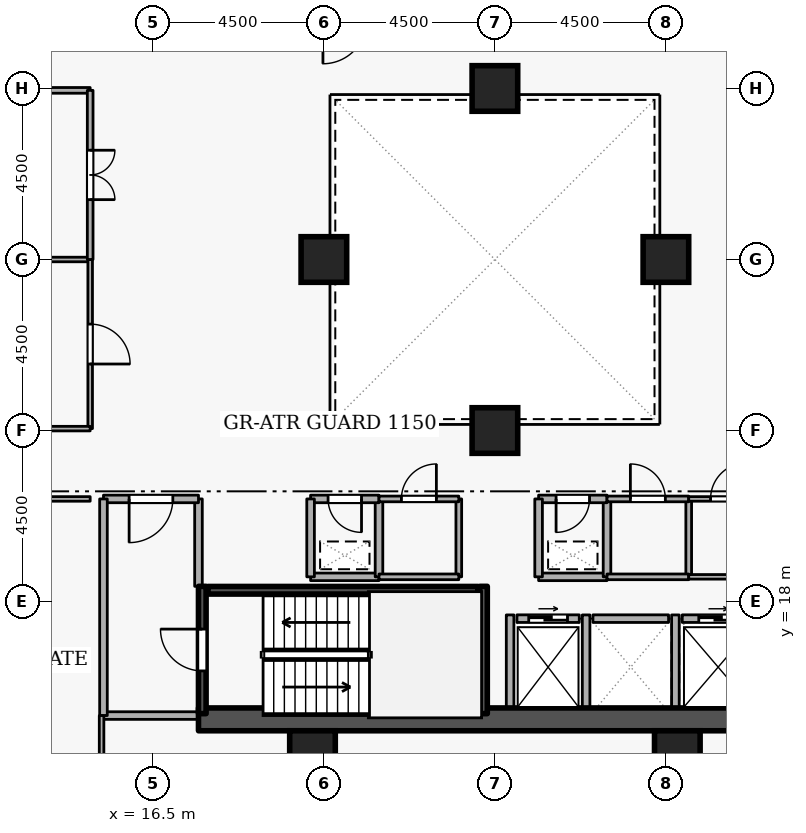
"""IFC4 building model, lengths in metres.
Left out: names, types, materials, properties, quantities, classifications, styles, units other than length and angle.
Written with IfcOpenShell. Run it as: python <this file> out.ifc"""

import sys

from ifc_helpers import new_model, si_unit, direction, frame, frame_2d, origin, origin_2d, place, context, subcontext, project, spatial, rectangle, extrude, element, fill, save


model = new_model("IFC4")
c1 = context("Model", 3, precision=1e-05, world=origin(), true_north=direction((0.0, 1.0)))
c2 = subcontext(c1, "Body", "Model", "MODEL_VIEW")
j1 = project(units=[si_unit("LENGTHUNIT", "METRE"), si_unit("PLANEANGLEUNIT", "RADIAN")], contexts=[c1])
p1 = place(None, origin())
s1 = spatial("IfcSite", under=j1, at=p1, CompositionType="ELEMENT")
p2 = place(p1, origin())
s2 = spatial("IfcBuilding", under=s1, at=p2, CompositionType="ELEMENT")
p3 = place(p2, frame((0.0, 0.0, 83.7)))
s3 = spatial("IfcBuildingStorey", under=s2, at=p3, CompositionType="ELEMENT", Elevation=83.7)
p4 = place(p3, frame((17.7, 14.9, 0.0), z_axis=(0.0, 0.0, 1.0), x_axis=(1.0, 0.0, 0.0)))
e1 = element("IfcWall", 1, at=p4, inside=s3, PredefinedType="SHEAR", context=c2, shape_type="SweptSolid", body=[
    extrude(rectangle(XDim=15.6, YDim=0.6, at=frame_2d((7.8, 0.0))), origin(), (0.0, 0.0, 1.0), 3.6),
])
for number, where, z_axis, x_axis in (
    (2, (20.7, 14.0, 0.0), (0.0, 0.0, 1.0), (1.0, 0.0, 0.0)),
    (3, (30.3, 14.0, 0.0), (0.0, 0.0, 1.0), (1.0, 0.0, 0.0)),
    (4, (25.5, 22.5, 0.0), (0.0, 0.0, 1.0), (1.0, 0.0, 0.0)),
    (5, (25.5, 31.5, 0.0), (0.0, 0.0, 1.0), (1.0, 0.0, 0.0)),
    (6, (21.0, 27.0, 0.0), (0.0, 0.0, 1.0), (1.0, 0.0, 0.0)),
    (7, (30.0, 27.0, 0.0), (0.0, 0.0, 1.0), (1.0, 0.0, 0.0)),
):
    element("IfcColumn", number, at=place(p3, frame(where, z_axis=z_axis, x_axis=x_axis)), inside=s3, PredefinedType="COLUMN", context=c2, shape_type="SweptSolid", body=[
        extrude(rectangle(XDim=1.2, YDim=1.2, at=origin_2d()), origin(), (0.0, 0.0, 1.0), 3.6),
    ])
p5 = place(p3, frame((26.08, 17.55, 0.0), z_axis=(0.0, 0.0, 1.0), x_axis=(1.0, 0.0, 0.0)))
e8 = element("IfcWall", 8, at=p5, inside=s3, PredefinedType="STANDARD", context=c2, shape_type="SweptSolid", body=[
    extrude(rectangle(XDim=1.64, YDim=0.2, at=frame_2d((0.82, 0.0))), origin(), (0.0, 0.0, 1.0), 3.34),
])
p6 = place(p5, frame((0.31, 0.0, 0.0)))
e9 = element("IfcOpeningElement", 9, at=p6, cuts=e8, PredefinedType="OPENING", context=c2, shape_type="SweptSolid", body=[
    extrude(rectangle(XDim=1.02, YDim=2.06, at=frame_2d((0.51, 1.03))), frame((0.0, 0.11, 0.0), z_axis=(0.0, -1.0, 0.0), x_axis=(1.0, 0.0, 0.0)), (0.0, 0.0, 1.0), 0.22),
])
p7 = place(p3, frame((28.08, 17.55, 0.0), z_axis=(0.0, 0.0, 1.0), x_axis=(1.0, 0.0, 0.0)))
e10 = element("IfcWall", 10, at=p7, inside=s3, PredefinedType="STANDARD", context=c2, shape_type="SweptSolid", body=[
    extrude(rectangle(XDim=1.99, YDim=0.2, at=frame_2d((0.995, 0.0))), origin(), (0.0, 0.0, 1.0), 3.34),
])
p8 = place(p3, frame((30.43, 17.55, 0.0), z_axis=(0.0, 0.0, 1.0), x_axis=(1.0, 0.0, 0.0)))
e11 = element("IfcWall", 11, at=p8, inside=s3, PredefinedType="STANDARD", context=c2, shape_type="SweptSolid", body=[
    extrude(rectangle(XDim=1.89, YDim=0.2, at=frame_2d((0.945, 0.0))), origin(), (0.0, 0.0, 1.0), 3.34),
])
p9 = place(p8, frame((0.435, 0.0, 0.0)))
e12 = element("IfcOpeningElement", 12, at=p9, cuts=e11, PredefinedType="OPENING", context=c2, shape_type="SweptSolid", body=[
    extrude(rectangle(XDim=1.02, YDim=2.06, at=frame_2d((0.51, 1.03))), frame((0.0, 0.11, 0.0), z_axis=(0.0, -1.0, 0.0), x_axis=(1.0, 0.0, 0.0)), (0.0, 0.0, 1.0), 0.22),
])
for number, where, z_axis, x_axis in (
    (13, (27.9, 15.212, 0.0), (0.0, 0.0, 1.0), (0.0, 1.0, 0.0)),
    (14, (25.9, 15.212, 0.0), (0.0, 0.0, 1.0), (0.0, 1.0, 0.0)),
    (15, (30.25, 15.212, 0.0), (0.0, 0.0, 1.0), (0.0, 1.0, 0.0)),
):
    element("IfcWall", number, at=place(p3, frame(where, z_axis=z_axis, x_axis=x_axis)), inside=s3, PredefinedType="STANDARD", context=c2, shape_type="SweptSolid", body=[
        extrude(rectangle(XDim=2.436, YDim=0.2, at=frame_2d((1.218, 0.0))), origin(), (0.0, 0.0, 1.0), 3.34),
    ])
p10 = place(p3, frame((17.8, 15.05, 0.0), z_axis=(0.0, 0.0, 1.0), x_axis=(0.0, 1.0, 0.0)))
e16 = element("IfcWall", 16, at=p10, inside=s3, PredefinedType="SHEAR", context=c2, shape_type="SweptSolid", body=[
    extrude(rectangle(XDim=3.35, YDim=0.2, at=frame_2d((1.675, 0.0))), origin(), (0.0, 0.0, 1.0), 3.6),
])
p11 = place(p10, frame((1.125, 0.0, 0.0)))
e17 = element("IfcOpeningElement", 17, at=p11, cuts=e16, PredefinedType="OPENING", context=c2, shape_type="SweptSolid", body=[
    extrude(rectangle(XDim=1.1, YDim=2.1, at=frame_2d((0.55, 1.05))), frame((0.0, 0.11, 0.0), z_axis=(0.0, -1.0, 0.0), x_axis=(1.0, 0.0, 0.0)), (0.0, 0.0, 1.0), 0.22),
])
p12 = place(p3, frame((25.2, 18.4, 0.0), z_axis=(0.0, 0.0, 1.0), x_axis=(0.0, -1.0, 0.0)))
e18 = element("IfcWall", 18, at=p12, inside=s3, PredefinedType="SHEAR", context=c2, shape_type="SweptSolid", body=[
    extrude(rectangle(XDim=3.35, YDim=0.2, at=frame_2d((1.675, 0.0))), origin(), (0.0, 0.0, 1.0), 3.6),
])
p13 = place(p3, frame((25.05, 18.297, 0.0), z_axis=(0.0, 0.0, 1.0), x_axis=(-1.0, 0.0, 0.0)))
e19 = element("IfcWall", 19, at=p13, inside=s3, PredefinedType="SHEAR", context=c2, shape_type="SweptSolid", body=[
    extrude(rectangle(XDim=7.1, YDim=0.2, at=frame_2d((3.55, 0.0))), origin(), (0.0, 0.0, 1.0), 3.6),
])
p14 = place(p3, frame((15.2, 15.0, 0.0), z_axis=(0.0, 0.0, 1.0), x_axis=(1.0, 0.0, 0.0)))
e20 = element("IfcWall", 20, at=p14, inside=s3, PredefinedType="STANDARD", context=c2, shape_type="SweptSolid", body=[
    extrude(rectangle(XDim=2.5, YDim=0.2, at=frame_2d((1.25, 0.0))), origin(), (0.0, 0.0, 1.0), 3.34),
])
p15 = place(p3, frame((17.7, 18.4, 0.0), z_axis=(0.0, 0.0, 1.0), x_axis=(0.0, 1.0, 0.0)))
e21 = element("IfcWall", 21, at=p15, inside=s3, PredefinedType="STANDARD", context=c2, shape_type="SweptSolid", body=[
    extrude(rectangle(XDim=2.3, YDim=0.2, at=frame_2d((1.15, 0.0))), origin(), (0.0, 0.0, 1.0), 2.545),
])
p16 = place(p3, frame((17.7, 20.7, 0.0), z_axis=(0.0, 0.0, 1.0), x_axis=(-1.0, 0.0, 0.0)))
e22 = element("IfcWall", 22, at=p16, inside=s3, PredefinedType="STANDARD", context=c2, shape_type="SweptSolid", body=[
    extrude(rectangle(XDim=2.5, YDim=0.2, at=frame_2d((1.25, 0.0))), origin(), (0.0, 0.0, 1.0), 3.34),
])
p17 = place(p16, frame((0.675, 0.0, 0.0)))
e23 = element("IfcOpeningElement", 23, at=p17, cuts=e22, PredefinedType="OPENING", context=c2, shape_type="SweptSolid", body=[
    extrude(rectangle(XDim=1.15, YDim=2.1, at=frame_2d((0.575, 1.05))), frame((0.0, 0.11, 0.0), z_axis=(0.0, -1.0, 0.0), x_axis=(1.0, 0.0, 0.0)), (0.0, 0.0, 1.0), 0.22),
])
p18 = place(p3, frame((15.2, 20.7, 0.0), z_axis=(0.0, 0.0, 1.0), x_axis=(0.0, -1.0, 0.0)))
e24 = element("IfcWall", 24, at=p18, inside=s3, PredefinedType="STANDARD", context=c2, shape_type="SweptSolid", body=[
    extrude(rectangle(XDim=5.7, YDim=0.2, at=frame_2d((2.85, 0.0))), origin(), (0.0, 0.0, 1.0), 3.34),
])
p19 = place(p3, frame((26.65, 18.65, 0.0), z_axis=(0.0, 0.0, 1.0), x_axis=(1.0, 0.0, 0.0)))
e25 = element("IfcWall", 25, at=p19, inside=s3, PredefinedType="STANDARD", context=c2, shape_type="SweptSolid", body=[
    extrude(rectangle(XDim=1.8, YDim=0.2, at=frame_2d((0.9, 0.0))), origin(), (0.0, 0.0, 1.0), 3.34),
])
p20 = place(p3, frame((28.45, 18.65, 0.0), z_axis=(0.0, 0.0, 1.0), x_axis=(0.0, 1.0, 0.0)))
e26 = element("IfcWall", 26, at=p20, inside=s3, PredefinedType="STANDARD", context=c2, shape_type="SweptSolid", body=[
    extrude(rectangle(XDim=2.05, YDim=0.2, at=frame_2d((1.025, 0.0))), origin(), (0.0, 0.0, 1.0), 3.34),
])
p21 = place(p3, frame((28.45, 20.7, 0.0), z_axis=(0.0, 0.0, 1.0), x_axis=(-1.0, 0.0, 0.0)))
e27 = element("IfcWall", 27, at=p21, inside=s3, PredefinedType="STANDARD", context=c2, shape_type="SweptSolid", body=[
    extrude(rectangle(XDim=1.8, YDim=0.2, at=frame_2d((0.9, 0.0))), origin(), (0.0, 0.0, 1.0), 3.34),
])
p22 = place(p21, frame((0.46, 0.0, 0.0)))
e28 = element("IfcOpeningElement", 28, at=p22, cuts=e27, PredefinedType="OPENING", context=c2, shape_type="SweptSolid", body=[
    extrude(rectangle(XDim=0.88, YDim=2.04, at=frame_2d((0.44, 1.02))), frame((0.0, 0.11, 0.0), z_axis=(0.0, -1.0, 0.0), x_axis=(1.0, 0.0, 0.0)), (0.0, 0.0, 1.0), 0.22),
])
p23 = place(p3, frame((26.65, 20.7, 0.0), z_axis=(0.0, 0.0, 1.0), x_axis=(0.0, -1.0, 0.0)))
e29 = element("IfcWall", 29, at=p23, inside=s3, PredefinedType="STANDARD", context=c2, shape_type="SweptSolid", body=[
    extrude(rectangle(XDim=2.05, YDim=0.2, at=frame_2d((1.025, 0.0))), origin(), (0.0, 0.0, 1.0), 3.34),
])
p24 = place(p3, frame((20.65, 18.65, 0.0), z_axis=(0.0, 0.0, 1.0), x_axis=(1.0, 0.0, 0.0)))
e30 = element("IfcWall", 30, at=p24, inside=s3, PredefinedType="STANDARD", context=c2, shape_type="SweptSolid", body=[
    extrude(rectangle(XDim=1.8, YDim=0.2, at=frame_2d((0.9, 0.0))), origin(), (0.0, 0.0, 1.0), 3.34),
])
p25 = place(p3, frame((22.45, 18.65, 0.0), z_axis=(0.0, 0.0, 1.0), x_axis=(0.0, 1.0, 0.0)))
e31 = element("IfcWall", 31, at=p25, inside=s3, PredefinedType="STANDARD", context=c2, shape_type="SweptSolid", body=[
    extrude(rectangle(XDim=2.05, YDim=0.2, at=frame_2d((1.025, 0.0))), origin(), (0.0, 0.0, 1.0), 3.34),
])
p26 = place(p3, frame((22.45, 20.7, 0.0), z_axis=(0.0, 0.0, 1.0), x_axis=(-1.0, 0.0, 0.0)))
e32 = element("IfcWall", 32, at=p26, inside=s3, PredefinedType="STANDARD", context=c2, shape_type="SweptSolid", body=[
    extrude(rectangle(XDim=1.8, YDim=0.2, at=frame_2d((0.9, 0.0))), origin(), (0.0, 0.0, 1.0), 3.34),
])
p27 = place(p26, frame((0.46, 0.0, 0.0)))
e33 = element("IfcOpeningElement", 33, at=p27, cuts=e32, PredefinedType="OPENING", context=c2, shape_type="SweptSolid", body=[
    extrude(rectangle(XDim=0.88, YDim=2.04, at=frame_2d((0.44, 1.02))), frame((0.0, 0.11, 0.0), z_axis=(0.0, -1.0, 0.0), x_axis=(1.0, 0.0, 0.0)), (0.0, 0.0, 1.0), 0.22),
])
p28 = place(p3, frame((20.65, 20.7, 0.0), z_axis=(0.0, 0.0, 1.0), x_axis=(0.0, -1.0, 0.0)))
e34 = element("IfcWall", 34, at=p28, inside=s3, PredefinedType="STANDARD", context=c2, shape_type="SweptSolid", body=[
    extrude(rectangle(XDim=2.05, YDim=0.2, at=frame_2d((1.025, 0.0))), origin(), (0.0, 0.0, 1.0), 3.34),
])
p29 = place(p3, frame((24.55, 20.7, 0.0), z_axis=(0.0, 0.0, 1.0), x_axis=(0.0, -1.0, 0.0)))
e35 = element("IfcWall", 35, at=p29, inside=s3, PredefinedType="PARTITIONING", context=c2, shape_type="SweptSolid", body=[
    extrude(rectangle(XDim=2.05, YDim=0.15, at=frame_2d((1.025, 0.0))), origin(), (0.0, 0.0, 1.0), 3.34),
])
p30 = place(p3, frame((24.55, 18.65, 0.0), z_axis=(0.0, 0.0, 1.0), x_axis=(-1.0, 0.0, 0.0)))
e36 = element("IfcWall", 36, at=p30, inside=s3, PredefinedType="PARTITIONING", context=c2, shape_type="SweptSolid", body=[
    extrude(rectangle(XDim=2.1, YDim=0.15, at=frame_2d((1.05, 0.0))), origin(), (0.0, 0.0, 1.0), 3.34),
])
p31 = place(p3, frame((22.45, 20.7, 0.0), z_axis=(0.0, 0.0, 1.0), x_axis=(1.0, 0.0, 0.0)))
e37 = element("IfcWall", 37, at=p31, inside=s3, PredefinedType="PARTITIONING", context=c2, shape_type="SweptSolid", body=[
    extrude(rectangle(XDim=2.1, YDim=0.15, at=frame_2d((1.05, 0.0))), origin(), (0.0, 0.0, 1.0), 3.34),
])
p32 = place(p31, frame((0.59, 0.0, 0.0)))
e38 = element("IfcOpeningElement", 38, at=p32, cuts=e37, PredefinedType="OPENING", context=c2, shape_type="SweptSolid", body=[
    extrude(rectangle(XDim=0.92, YDim=2.08, at=frame_2d((0.46, 1.04))), frame((0.0, 0.085, 0.0), z_axis=(0.0, -1.0, 0.0), x_axis=(1.0, 0.0, 0.0)), (0.0, 0.0, 1.0), 0.17),
])
p33 = place(p3, frame((30.6, 20.7, 0.0), z_axis=(0.0, 0.0, 1.0), x_axis=(0.0, -1.0, 0.0)))
e39 = element("IfcWall", 39, at=p33, inside=s3, PredefinedType="PARTITIONING", context=c2, shape_type="SweptSolid", body=[
    extrude(rectangle(XDim=2.05, YDim=0.15, at=frame_2d((1.025, 0.0))), origin(), (0.0, 0.0, 1.0), 3.34),
])
p34 = place(p3, frame((30.6, 18.65, 0.0), z_axis=(0.0, 0.0, 1.0), x_axis=(-1.0, 0.0, 0.0)))
e40 = element("IfcWall", 40, at=p34, inside=s3, PredefinedType="PARTITIONING", context=c2, shape_type="SweptSolid", body=[
    extrude(rectangle(XDim=2.15, YDim=0.15, at=frame_2d((1.075, 0.0))), origin(), (0.0, 0.0, 1.0), 3.34),
])
p35 = place(p3, frame((28.45, 20.7, 0.0), z_axis=(0.0, 0.0, 1.0), x_axis=(1.0, 0.0, 0.0)))
e41 = element("IfcWall", 41, at=p35, inside=s3, PredefinedType="PARTITIONING", context=c2, shape_type="SweptSolid", body=[
    extrude(rectangle(XDim=2.15, YDim=0.15, at=frame_2d((1.075, 0.0))), origin(), (0.0, 0.0, 1.0), 3.34),
])
p36 = place(p35, frame((0.615, 0.0, 0.0)))
e42 = element("IfcOpeningElement", 42, at=p36, cuts=e41, PredefinedType="OPENING", context=c2, shape_type="SweptSolid", body=[
    extrude(rectangle(XDim=0.92, YDim=2.08, at=frame_2d((0.46, 1.04))), frame((0.0, 0.085, 0.0), z_axis=(0.0, -1.0, 0.0), x_axis=(1.0, 0.0, 0.0)), (0.0, 0.0, 1.0), 0.17),
])
p37 = place(p3, frame((32.7, 18.65, 0.0), z_axis=(0.0, 0.0, 1.0), x_axis=(-1.0, 0.0, 0.0)))
e43 = element("IfcWall", 43, at=p37, inside=s3, PredefinedType="PARTITIONING", context=c2, shape_type="SweptSolid", body=[
    extrude(rectangle(XDim=2.1, YDim=0.12, at=frame_2d((1.05, 0.0))), origin(), (0.0, 0.0, 1.0), 3.34),
])
p38 = place(p3, frame((30.6, 20.7, 0.0), z_axis=(0.0, 0.0, 1.0), x_axis=(1.0, 0.0, 0.0)))
e44 = element("IfcWall", 44, at=p38, inside=s3, PredefinedType="PARTITIONING", context=c2, shape_type="SweptSolid", body=[
    extrude(rectangle(XDim=2.1, YDim=0.12, at=frame_2d((1.05, 0.0))), origin(), (0.0, 0.0, 1.0), 3.34),
])
p39 = place(p38, frame((0.575, 0.0, 0.0)))
e45 = element("IfcOpeningElement", 45, at=p39, cuts=e44, PredefinedType="OPENING", context=c2, shape_type="SweptSolid", body=[
    extrude(rectangle(XDim=0.95, YDim=2.1, at=frame_2d((0.475, 1.05))), frame((0.0, 0.07, 0.0), z_axis=(0.0, -1.0, 0.0), x_axis=(1.0, 0.0, 0.0)), (0.0, 0.0, 1.0), 0.14),
])
p40 = place(p3, frame((7.58, 27.0, 0.0), z_axis=(0.0, 0.0, 1.0), x_axis=(1.0, 0.0, 0.0)))
e46 = element("IfcWall", 46, at=p40, inside=s3, PredefinedType="PARTITIONING", context=c2, shape_type="SweptSolid", body=[
    extrude(rectangle(XDim=7.27, YDim=0.12, at=frame_2d((3.635, 0.0))), origin(), (0.0, 0.0, 1.0), 2.882),
])
p41 = place(p3, frame((14.85, 27.0, 0.0), z_axis=(0.0, 0.0, 1.0), x_axis=(0.0, -1.0, 0.0)))
e47 = element("IfcWall", 47, at=p41, inside=s3, PredefinedType="PARTITIONING", context=c2, shape_type="SweptSolid", body=[
    extrude(rectangle(XDim=4.45, YDim=0.12, at=frame_2d((2.225, 0.0))), origin(), (0.0, 0.0, 1.0), 3.34),
])
p42 = place(p41, frame((1.7, 0.0, 0.0)))
e48 = element("IfcOpeningElement", 48, at=p42, cuts=e47, PredefinedType="OPENING", context=c2, shape_type="SweptSolid", body=[
    extrude(rectangle(XDim=1.05, YDim=2.1, at=frame_2d((0.525, 1.05))), frame((0.0, 0.07, 0.0), z_axis=(0.0, -1.0, 0.0), x_axis=(1.0, 0.0, 0.0)), (0.0, 0.0, 1.0), 0.14),
])
for number, where, z_axis, x_axis in (
    (49, (14.85, 22.55, 0.0), (0.0, 0.0, 1.0), (-1.0, 0.0, 0.0)),
    (50, (13.25, 20.7, 0.0), (0.0, 0.0, 1.0), (1.0, 0.0, 0.0)),
):
    element("IfcWall", number, at=place(p3, frame(where, z_axis=z_axis, x_axis=x_axis)), inside=s3, PredefinedType="PARTITIONING", context=c2, shape_type="SweptSolid", body=[
        extrude(rectangle(XDim=1.6, YDim=0.12, at=frame_2d((0.8, 0.0))), origin(), (0.0, 0.0, 1.0), 3.34),
    ])
p43 = place(p3, frame((15.15, 15.0, 0.0), z_axis=(0.0, 0.0, 1.0), x_axis=(0.0, -1.0, 0.0)))
e51 = element("IfcWall", 51, at=p43, inside=s3, PredefinedType="PARTITIONING", context=c2, shape_type="SweptSolid", body=[
    extrude(rectangle(XDim=5.92, YDim=0.12, at=frame_2d((2.96, 0.0))), origin(), (0.0, 0.0, 1.0), 3.34),
])
p44 = place(p3, frame((13.25, 31.45, 0.0), z_axis=(0.0, 0.0, 1.0), x_axis=(1.0, 0.0, 0.0)))
e52 = element("IfcWall", 52, at=p44, inside=s3, PredefinedType="PARTITIONING", context=c2, shape_type="SweptSolid", body=[
    extrude(rectangle(XDim=1.6, YDim=0.15, at=frame_2d((0.8, 0.0))), origin(), (0.0, 0.0, 1.0), 3.34),
])
p45 = place(p3, frame((14.85, 31.45, 0.0), z_axis=(0.0, 0.0, 1.0), x_axis=(0.0, -1.0, 0.0)))
e53 = element("IfcWall", 53, at=p45, inside=s3, PredefinedType="PARTITIONING", context=c2, shape_type="SweptSolid", body=[
    extrude(rectangle(XDim=4.45, YDim=0.15, at=frame_2d((2.225, 0.0))), origin(), (0.0, 0.0, 1.0), 3.34),
])
p46 = place(p45, frame((1.575, 0.0, 0.0)))
e54 = element("IfcOpeningElement", 54, at=p46, cuts=e53, PredefinedType="OPENING", context=c2, shape_type="SweptSolid", body=[
    extrude(rectangle(XDim=1.3, YDim=2.12, at=frame_2d((0.65, 1.06))), frame((0.0, 0.085, 0.0), z_axis=(0.0, -1.0, 0.0), x_axis=(1.0, 0.0, 0.0)), (0.0, 0.0, 1.0), 0.17),
])
p47 = place(p6, origin())
e55 = element("IfcDoor", 55, at=p47, inside=s3, OperationType="SLIDING_TO_LEFT", PredefinedType="DOOR", context=c2, shape_type="SweptSolid", body=[
    extrude(rectangle(XDim=1.02, YDim=2.06, at=frame_2d((0.51, 1.03))), frame((0.0, 0.025, 0.0), z_axis=(0.0, -1.0, 0.0), x_axis=(1.0, 0.0, 0.0)), (0.0, 0.0, 1.0), 0.05),
])
fill(e9, e55)
p48 = place(p9, origin())
e56 = element("IfcDoor", 56, at=p48, inside=s3, OperationType="SLIDING_TO_LEFT", PredefinedType="DOOR", context=c2, shape_type="SweptSolid", body=[
    extrude(rectangle(XDim=1.02, YDim=2.06, at=frame_2d((0.51, 1.03))), frame((0.0, 0.025, 0.0), z_axis=(0.0, -1.0, 0.0), x_axis=(1.0, 0.0, 0.0)), (0.0, 0.0, 1.0), 0.05),
])
fill(e12, e56)
p49 = place(p11, origin())
e57 = element("IfcDoor", 57, at=p49, inside=s3, OperationType="SINGLE_SWING_RIGHT", PredefinedType="DOOR", context=c2, shape_type="SweptSolid", body=[
    extrude(rectangle(XDim=1.1, YDim=2.1, at=frame_2d((0.55, 1.05))), frame((0.0, 0.025, 0.0), z_axis=(0.0, -1.0, 0.0), x_axis=(1.0, 0.0, 0.0)), (0.0, 0.0, 1.0), 0.05),
])
fill(e17, e57)
p50 = place(p17, origin())
e58 = element("IfcDoor", 58, at=p50, inside=s3, OperationType="SINGLE_SWING_RIGHT", PredefinedType="DOOR", context=c2, shape_type="SweptSolid", body=[
    extrude(rectangle(XDim=1.15, YDim=2.1, at=frame_2d((0.575, 1.05))), frame((0.0, 0.025, 0.0), z_axis=(0.0, -1.0, 0.0), x_axis=(1.0, 0.0, 0.0)), (0.0, 0.0, 1.0), 0.05),
])
fill(e23, e58)
p51 = place(p22, origin())
e59 = element("IfcDoor", 59, at=p51, inside=s3, OperationType="SINGLE_SWING_RIGHT", PredefinedType="DOOR", context=c2, shape_type="SweptSolid", body=[
    extrude(rectangle(XDim=0.88, YDim=2.04, at=frame_2d((0.44, 1.02))), frame((0.0, 0.025, 0.0), z_axis=(0.0, -1.0, 0.0), x_axis=(1.0, 0.0, 0.0)), (0.0, 0.0, 1.0), 0.05),
])
fill(e28, e59)
p52 = place(p27, origin())
e60 = element("IfcDoor", 60, at=p52, inside=s3, OperationType="SINGLE_SWING_LEFT", PredefinedType="DOOR", context=c2, shape_type="SweptSolid", body=[
    extrude(rectangle(XDim=0.88, YDim=2.04, at=frame_2d((0.44, 1.02))), frame((0.0, 0.025, 0.0), z_axis=(0.0, -1.0, 0.0), x_axis=(1.0, 0.0, 0.0)), (0.0, 0.0, 1.0), 0.05),
])
fill(e33, e60)
p53 = place(p32, origin())
e61 = element("IfcDoor", 61, at=p53, inside=s3, OperationType="SINGLE_SWING_RIGHT", PredefinedType="DOOR", context=c2, shape_type="SweptSolid", body=[
    extrude(rectangle(XDim=0.92, YDim=2.08, at=frame_2d((0.46, 1.04))), frame((0.0, 0.025, 0.0), z_axis=(0.0, -1.0, 0.0), x_axis=(1.0, 0.0, 0.0)), (0.0, 0.0, 1.0), 0.05),
])
fill(e38, e61)
p54 = place(p36, origin())
e62 = element("IfcDoor", 62, at=p54, inside=s3, OperationType="SINGLE_SWING_LEFT", PredefinedType="DOOR", context=c2, shape_type="SweptSolid", body=[
    extrude(rectangle(XDim=0.92, YDim=2.08, at=frame_2d((0.46, 1.04))), frame((0.0, 0.025, 0.0), z_axis=(0.0, -1.0, 0.0), x_axis=(1.0, 0.0, 0.0)), (0.0, 0.0, 1.0), 0.05),
])
fill(e42, e62)
p55 = place(p39, origin())
e63 = element("IfcDoor", 63, at=p55, inside=s3, OperationType="SINGLE_SWING_RIGHT", PredefinedType="DOOR", context=c2, shape_type="SweptSolid", body=[
    extrude(rectangle(XDim=0.95, YDim=2.1, at=frame_2d((0.475, 1.05))), frame((0.0, 0.025, 0.0), z_axis=(0.0, -1.0, 0.0), x_axis=(1.0, 0.0, 0.0)), (0.0, 0.0, 1.0), 0.05),
])
fill(e45, e63)
p56 = place(p42, origin())
e64 = element("IfcDoor", 64, at=p56, inside=s3, OperationType="SINGLE_SWING_RIGHT", PredefinedType="DOOR", context=c2, shape_type="SweptSolid", body=[
    extrude(rectangle(XDim=1.05, YDim=2.1, at=frame_2d((0.525, 1.05))), frame((0.0, 0.025, 0.0), z_axis=(0.0, -1.0, 0.0), x_axis=(1.0, 0.0, 0.0)), (0.0, 0.0, 1.0), 0.05),
])
fill(e48, e64)
p57 = place(p46, origin())
e65 = element("IfcDoor", 65, at=p57, inside=s3, OperationType="DOUBLE_DOOR_SINGLE_SWING", PredefinedType="DOOR", context=c2, shape_type="SweptSolid", body=[
    extrude(rectangle(XDim=1.3, YDim=2.12, at=frame_2d((0.65, 1.06))), frame((0.0, 0.025, 0.0), z_axis=(0.0, -1.0, 0.0), x_axis=(1.0, 0.0, 0.0)), (0.0, 0.0, 1.0), 0.05),
])
fill(e54, e65)
save(model, sys.argv[1])
